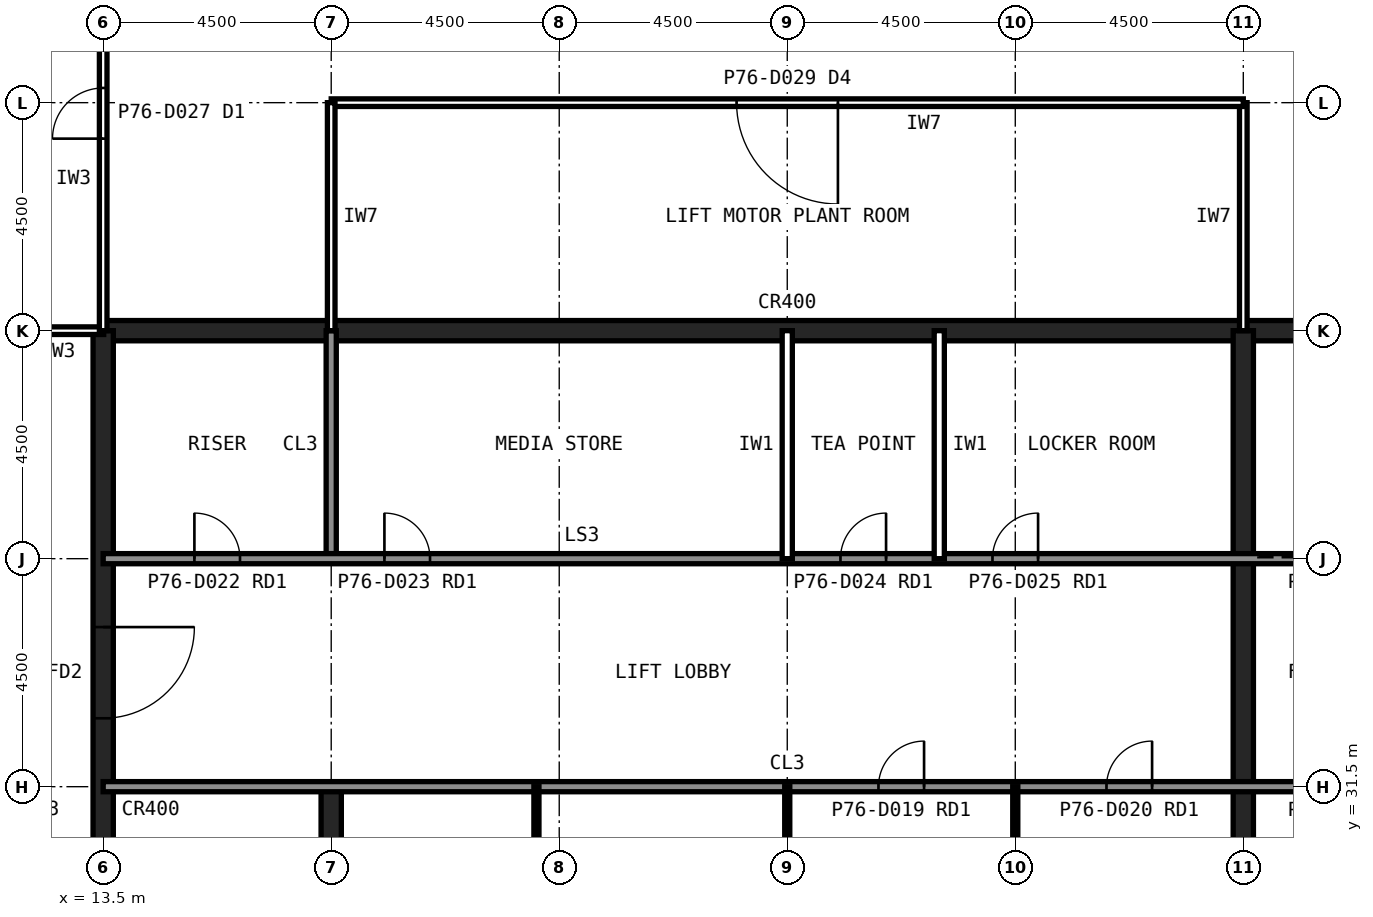
"""IFC4 building model, lengths in metres.
Left out: names, types, materials, properties, quantities, classifications, styles, units other than length and angle.
Written with IfcOpenShell. Run it as: python <this file> out.ifc"""

import sys

from ifc_helpers import new_model, si_unit, direction, frame, frame_2d, origin, place, context, subcontext, project, spatial, polyline, rectangle, outline, extrude, element, fill, save


model = new_model("IFC4")
c1 = context("Model", 3, precision=1e-05, world=origin(), true_north=direction((0.0, 1.0)))
c2 = subcontext(c1, "Body", "Model", "MODEL_VIEW")
j1 = project(units=[si_unit("LENGTHUNIT", "METRE"), si_unit("PLANEANGLEUNIT", "RADIAN")], contexts=[c1])
p1 = place(None, origin())
s1 = spatial("IfcSite", under=j1, at=p1, CompositionType="ELEMENT")
p2 = place(p1, origin())
s2 = spatial("IfcBuilding", under=s1, at=p2, CompositionType="ELEMENT")
p3 = place(p2, frame((0.0, 0.0, 320.1)))
s3 = spatial("IfcBuildingStorey", under=s2, at=p3, CompositionType="ELEMENT", Elevation=320.1)
p4 = place(p3, frame((40.5, 40.5, 0.0), z_axis=(0.0, 0.0, 1.0), x_axis=(-1.0, 0.0, 0.0)))
e1 = element("IfcWall", 1, at=p4, inside=s3, PredefinedType="SHEAR", context=c2, shape_type="SweptSolid", body=[
    extrude(rectangle(XDim=27.0, YDim=0.4, at=frame_2d((13.5, 0.0))), origin(), (0.0, 0.0, 1.0), 17.377),
])
p5 = place(p3, frame((13.5, 40.5, 0.0), z_axis=(0.0, 0.0, 1.0), x_axis=(0.0, -1.0, 0.0)))
e2 = element("IfcWall", 2, at=p5, inside=s3, PredefinedType="SHEAR", context=c2, shape_type="SweptSolid", body=[
    extrude(outline(polyline([(0.0, 0.0), (27.0, 0.0), (27.0, 9.277), (0.0, 17.377), (0.0, 0.0)])), frame((0.0, 0.2, 0.0), z_axis=(0.0, -1.0, 0.0), x_axis=(1.0, 0.0, 0.0)), (0.0, 0.0, 1.0), 0.4),
])
p6 = place(p5, frame((19.65, 0.0, 0.0)))
e3 = element("IfcOpeningElement", 3, at=p6, cuts=e2, PredefinedType="OPENING", context=c2, shape_type="SweptSolid", body=[
    extrude(rectangle(XDim=1.2, YDim=2.1, at=frame_2d((0.6, 1.05))), frame((0.0, 0.21, 0.0), z_axis=(0.0, -1.0, 0.0), x_axis=(1.0, 0.0, 0.0)), (0.0, 0.0, 1.0), 0.42),
])
p7 = place(p5, frame((5.85, 0.0, 0.0)))
e4 = element("IfcOpeningElement", 4, at=p7, cuts=e2, PredefinedType="OPENING", context=c2, shape_type="SweptSolid", body=[
    extrude(rectangle(XDim=1.8, YDim=2.1, at=frame_2d((0.9, 1.05))), frame((0.0, 0.21, 0.0), z_axis=(0.0, -1.0, 0.0), x_axis=(1.0, 0.0, 0.0)), (0.0, 0.0, 1.0), 0.42),
])
p8 = place(p3, frame((18.0, 13.5, 0.0), z_axis=(0.0, 0.0, 1.0), x_axis=(0.0, 1.0, 0.0)))
e5 = element("IfcWall", 5, at=p8, inside=s3, PredefinedType="SHEAR", context=c2, shape_type="SweptSolid", body=[
    extrude(outline(polyline([(0.0, 0.0), (18.0, 0.0), (18.0, 14.677), (0.0, 9.277), (0.0, 0.0)])), frame((0.0, 0.2, 0.0), z_axis=(0.0, -1.0, 0.0), x_axis=(1.0, 0.0, 0.0)), (0.0, 0.0, 1.0), 0.4),
])
p9 = place(p3, frame((18.0, 36.0, 0.0), z_axis=(0.0, 0.0, 1.0), x_axis=(0.0, 1.0, 0.0)))
e6 = element("IfcWall", 6, at=p9, inside=s3, PredefinedType="SOLIDWALL", context=c2, shape_type="SweptSolid", body=[
    extrude(outline(polyline([(0.0, 0.0), (4.5, 0.0), (4.5, 17.227), (0.0, 15.877), (0.0, 0.0)])), frame((0.0, 0.1, 0.0), z_axis=(0.0, -1.0, 0.0), x_axis=(1.0, 0.0, 0.0)), (0.0, 0.0, 1.0), 0.2),
])
p10 = place(p3, frame((36.0, 22.5, 0.0), z_axis=(0.0, 0.0, 1.0), x_axis=(0.0, 1.0, 0.0)))
e7 = element("IfcWall", 7, at=p10, inside=s3, PredefinedType="SHEAR", context=c2, shape_type="SweptSolid", body=[
    extrude(outline(polyline([(0.0, 0.0), (18.0, 0.0), (18.0, 17.377), (0.0, 11.977), (0.0, 0.0)])), frame((0.0, 0.2, 0.0), z_axis=(0.0, -1.0, 0.0), x_axis=(1.0, 0.0, 0.0)), (0.0, 0.0, 1.0), 0.4),
])
p11 = place(p3, frame((13.5, 36.0, 0.0), z_axis=(0.0, 0.0, 1.0), x_axis=(1.0, 0.0, 0.0)))
e8 = element("IfcWall", 8, at=p11, inside=s3, PredefinedType="SOLIDWALL", context=c2, shape_type="SweptSolid", body=[
    extrude(rectangle(XDim=27.0, YDim=0.2, at=frame_2d((13.5, 0.0))), origin(), (0.0, 0.0, 1.0), 15.877),
])
p12 = place(p11, frame((1.8, 0.0, 0.0)))
e9 = element("IfcOpeningElement", 9, at=p12, cuts=e8, PredefinedType="OPENING", context=c2, shape_type="SweptSolid", body=[
    extrude(rectangle(XDim=0.9, YDim=2.1, at=frame_2d((0.45, 1.05))), frame((0.0, 0.11, 0.0), z_axis=(0.0, -1.0, 0.0), x_axis=(1.0, 0.0, 0.0)), (0.0, 0.0, 1.0), 0.22),
])
p13 = place(p11, frame((5.55, 0.0, 0.0)))
e10 = element("IfcOpeningElement", 10, at=p13, cuts=e8, PredefinedType="OPENING", context=c2, shape_type="SweptSolid", body=[
    extrude(rectangle(XDim=0.9, YDim=2.1, at=frame_2d((0.45, 1.05))), frame((0.0, 0.11, 0.0), z_axis=(0.0, -1.0, 0.0), x_axis=(1.0, 0.0, 0.0)), (0.0, 0.0, 1.0), 0.22),
])
p14 = place(p11, frame((14.55, 0.0, 0.0)))
e11 = element("IfcOpeningElement", 11, at=p14, cuts=e8, PredefinedType="OPENING", context=c2, shape_type="SweptSolid", body=[
    extrude(rectangle(XDim=0.9, YDim=2.1, at=frame_2d((0.45, 1.05))), frame((0.0, 0.11, 0.0), z_axis=(0.0, -1.0, 0.0), x_axis=(1.0, 0.0, 0.0)), (0.0, 0.0, 1.0), 0.22),
])
p15 = place(p11, frame((17.55, 0.0, 0.0)))
e12 = element("IfcOpeningElement", 12, at=p15, cuts=e8, PredefinedType="OPENING", context=c2, shape_type="SweptSolid", body=[
    extrude(rectangle(XDim=0.9, YDim=2.1, at=frame_2d((0.45, 1.05))), frame((0.0, 0.11, 0.0), z_axis=(0.0, -1.0, 0.0), x_axis=(1.0, 0.0, 0.0)), (0.0, 0.0, 1.0), 0.22),
])
p16 = place(p11, frame((24.1, 0.0, 0.0)))
e13 = element("IfcOpeningElement", 13, at=p16, cuts=e8, PredefinedType="OPENING", context=c2, shape_type="SweptSolid", body=[
    extrude(rectangle(XDim=1.3, YDim=2.2, at=frame_2d((0.65, 1.1))), frame((0.0, 0.11, 0.0), z_axis=(0.0, -1.0, 0.0), x_axis=(1.0, 0.0, 0.0)), (0.0, 0.0, 1.0), 0.22),
])
p17 = place(p3, frame((13.5, 31.5, 0.0), z_axis=(0.0, 0.0, 1.0), x_axis=(1.0, 0.0, 0.0)))
e14 = element("IfcWall", 14, at=p17, inside=s3, PredefinedType="SOLIDWALL", context=c2, shape_type="SweptSolid", body=[
    extrude(rectangle(XDim=27.0, YDim=0.2, at=frame_2d((13.5, 0.0))), origin(), (0.0, 0.0, 1.0), 14.527),
])
p18 = place(p17, frame((24.15, 0.0, 0.0)))
e15 = element("IfcOpeningElement", 15, at=p18, cuts=e14, PredefinedType="OPENING", context=c2, shape_type="SweptSolid", body=[
    extrude(rectangle(XDim=1.2, YDim=2.1, at=frame_2d((0.6, 1.05))), frame((0.0, 0.11, 0.0), z_axis=(0.0, -1.0, 0.0), x_axis=(1.0, 0.0, 0.0)), (0.0, 0.0, 1.0), 0.22),
])
p19 = place(p17, frame((15.3, 0.0, 0.0)))
e16 = element("IfcOpeningElement", 16, at=p19, cuts=e14, PredefinedType="OPENING", context=c2, shape_type="SweptSolid", body=[
    extrude(rectangle(XDim=0.9, YDim=2.1, at=frame_2d((0.45, 1.05))), frame((0.0, 0.11, 0.0), z_axis=(0.0, -1.0, 0.0), x_axis=(1.0, 0.0, 0.0)), (0.0, 0.0, 1.0), 0.22),
])
p20 = place(p17, frame((19.8, 0.0, 0.0)))
e17 = element("IfcOpeningElement", 17, at=p20, cuts=e14, PredefinedType="OPENING", context=c2, shape_type="SweptSolid", body=[
    extrude(rectangle(XDim=0.9, YDim=2.1, at=frame_2d((0.45, 1.05))), frame((0.0, 0.11, 0.0), z_axis=(0.0, -1.0, 0.0), x_axis=(1.0, 0.0, 0.0)), (0.0, 0.0, 1.0), 0.22),
])
p21 = place(p3, frame((-0.63, 36.261, 0.0), z_axis=(0.0, 0.0, 1.0), x_axis=(0.707106781187, 0.707106781187, 0.0)))
e18 = element("IfcWall", 18, at=p21, inside=s3, PredefinedType="SOLIDWALL", context=c2, shape_type="SweptSolid", body=[
    extrude(outline(polyline([(0.0, 0.0), (25.978, 0.0), (25.978, 23.789), (0.0, 18.278), (0.0, 0.0)])), frame((0.0, 0.15, 0.0), z_axis=(0.0, -1.0, 0.0), x_axis=(1.0, 0.0, 0.0)), (0.0, 0.0, 1.0), 0.3),
])
p22 = place(p21, frame((0.424, 0.0, 1.2)))
e19 = element("IfcOpeningElement", 19, at=p22, cuts=e18, PredefinedType="OPENING", context=c2, shape_type="SweptSolid", body=[
    extrude(rectangle(XDim=2.4, YDim=2.4, at=frame_2d((1.2, 1.2))), frame((0.0, 0.16, 0.0), z_axis=(0.0, -1.0, 0.0), x_axis=(1.0, 0.0, 0.0)), (0.0, 0.0, 1.0), 0.32),
])
p23 = place(p21, frame((3.671, 0.0, 1.2)))
e20 = element("IfcOpeningElement", 20, at=p23, cuts=e18, PredefinedType="OPENING", context=c2, shape_type="SweptSolid", body=[
    extrude(rectangle(XDim=2.4, YDim=2.4, at=frame_2d((1.2, 1.2))), frame((0.0, 0.16, 0.0), z_axis=(0.0, -1.0, 0.0), x_axis=(1.0, 0.0, 0.0)), (0.0, 0.0, 1.0), 0.32),
])
p24 = place(p21, frame((6.918, 0.0, 1.2)))
e21 = element("IfcOpeningElement", 21, at=p24, cuts=e18, PredefinedType="OPENING", context=c2, shape_type="SweptSolid", body=[
    extrude(rectangle(XDim=2.4, YDim=2.4, at=frame_2d((1.2, 1.2))), frame((0.0, 0.16, 0.0), z_axis=(0.0, -1.0, 0.0), x_axis=(1.0, 0.0, 0.0)), (0.0, 0.0, 1.0), 0.32),
])
p25 = place(p21, frame((10.165, 0.0, 1.2)))
e22 = element("IfcOpeningElement", 22, at=p25, cuts=e18, PredefinedType="OPENING", context=c2, shape_type="SweptSolid", body=[
    extrude(rectangle(XDim=2.4, YDim=2.4, at=frame_2d((1.2, 1.2))), frame((0.0, 0.16, 0.0), z_axis=(0.0, -1.0, 0.0), x_axis=(1.0, 0.0, 0.0)), (0.0, 0.0, 1.0), 0.32),
])
p26 = place(p21, frame((13.412, 0.0, 11.15)))
e23 = element("IfcOpeningElement", 23, at=p26, cuts=e18, PredefinedType="OPENING", context=c2, shape_type="SweptSolid", body=[
    extrude(rectangle(XDim=2.4, YDim=2.4, at=frame_2d((1.2, 1.2))), frame((0.0, 0.16, 0.0), z_axis=(0.0, -1.0, 0.0), x_axis=(1.0, 0.0, 0.0)), (0.0, 0.0, 1.0), 0.32),
])
p27 = place(p21, frame((16.66, 0.0, 11.3)))
e24 = element("IfcOpeningElement", 24, at=p27, cuts=e18, PredefinedType="OPENING", context=c2, shape_type="SweptSolid", body=[
    extrude(rectangle(XDim=2.4, YDim=2.4, at=frame_2d((1.2, 1.2))), frame((0.0, 0.16, 0.0), z_axis=(0.0, -1.0, 0.0), x_axis=(1.0, 0.0, 0.0)), (0.0, 0.0, 1.0), 0.32),
])
p28 = place(p21, frame((19.907, 0.0, 1.2)))
e25 = element("IfcOpeningElement", 25, at=p28, cuts=e18, PredefinedType="OPENING", context=c2, shape_type="SweptSolid", body=[
    extrude(rectangle(XDim=2.4, YDim=2.4, at=frame_2d((1.2, 1.2))), frame((0.0, 0.16, 0.0), z_axis=(0.0, -1.0, 0.0), x_axis=(1.0, 0.0, 0.0)), (0.0, 0.0, 1.0), 0.32),
])
p29 = place(p21, frame((23.154, 0.0, 1.2)))
e26 = element("IfcOpeningElement", 26, at=p29, cuts=e18, PredefinedType="OPENING", context=c2, shape_type="SweptSolid", body=[
    extrude(rectangle(XDim=2.4, YDim=2.4, at=frame_2d((1.2, 1.2))), frame((0.0, 0.16, 0.0), z_axis=(0.0, -1.0, 0.0), x_axis=(1.0, 0.0, 0.0)), (0.0, 0.0, 1.0), 0.32),
])
p30 = place(p3, frame((36.261, 54.63, 0.0), z_axis=(0.0, 0.0, 1.0), x_axis=(0.707106781187, -0.707106781187, 0.0)))
e27 = element("IfcWall", 27, at=p30, inside=s3, PredefinedType="SOLIDWALL", context=c2, shape_type="SweptSolid", body=[
    extrude(outline(polyline([(0.0, 0.0), (25.978, 0.0), (25.978, 18.278), (0.0, 23.789), (0.0, 0.0)])), frame((0.0, 0.15, 0.0), z_axis=(0.0, -1.0, 0.0), x_axis=(1.0, 0.0, 0.0)), (0.0, 0.0, 1.0), 0.3),
])
p31 = place(p30, frame((0.424, 0.0, 1.2)))
e28 = element("IfcOpeningElement", 28, at=p31, cuts=e27, PredefinedType="OPENING", context=c2, shape_type="SweptSolid", body=[
    extrude(rectangle(XDim=2.4, YDim=2.4, at=frame_2d((1.2, 1.2))), frame((0.0, 0.16, 0.0), z_axis=(0.0, -1.0, 0.0), x_axis=(1.0, 0.0, 0.0)), (0.0, 0.0, 1.0), 0.32),
])
p32 = place(p30, frame((3.671, 0.0, 1.2)))
e29 = element("IfcOpeningElement", 29, at=p32, cuts=e27, PredefinedType="OPENING", context=c2, shape_type="SweptSolid", body=[
    extrude(rectangle(XDim=2.4, YDim=2.4, at=frame_2d((1.2, 1.2))), frame((0.0, 0.16, 0.0), z_axis=(0.0, -1.0, 0.0), x_axis=(1.0, 0.0, 0.0)), (0.0, 0.0, 1.0), 0.32),
])
p33 = place(p30, frame((6.918, 0.0, 11.3)))
e30 = element("IfcOpeningElement", 30, at=p33, cuts=e27, PredefinedType="OPENING", context=c2, shape_type="SweptSolid", body=[
    extrude(rectangle(XDim=2.4, YDim=2.4, at=frame_2d((1.2, 1.2))), frame((0.0, 0.16, 0.0), z_axis=(0.0, -1.0, 0.0), x_axis=(1.0, 0.0, 0.0)), (0.0, 0.0, 1.0), 0.32),
])
p34 = place(p30, frame((10.165, 0.0, 11.15)))
e31 = element("IfcOpeningElement", 31, at=p34, cuts=e27, PredefinedType="OPENING", context=c2, shape_type="SweptSolid", body=[
    extrude(rectangle(XDim=2.4, YDim=2.4, at=frame_2d((1.2, 1.2))), frame((0.0, 0.16, 0.0), z_axis=(0.0, -1.0, 0.0), x_axis=(1.0, 0.0, 0.0)), (0.0, 0.0, 1.0), 0.32),
])
p35 = place(p30, frame((13.412, 0.0, 1.2)))
e32 = element("IfcOpeningElement", 32, at=p35, cuts=e27, PredefinedType="OPENING", context=c2, shape_type="SweptSolid", body=[
    extrude(rectangle(XDim=2.4, YDim=2.4, at=frame_2d((1.2, 1.2))), frame((0.0, 0.16, 0.0), z_axis=(0.0, -1.0, 0.0), x_axis=(1.0, 0.0, 0.0)), (0.0, 0.0, 1.0), 0.32),
])
p36 = place(p30, frame((16.66, 0.0, 1.2)))
e33 = element("IfcOpeningElement", 33, at=p36, cuts=e27, PredefinedType="OPENING", context=c2, shape_type="SweptSolid", body=[
    extrude(rectangle(XDim=2.4, YDim=2.4, at=frame_2d((1.2, 1.2))), frame((0.0, 0.16, 0.0), z_axis=(0.0, -1.0, 0.0), x_axis=(1.0, 0.0, 0.0)), (0.0, 0.0, 1.0), 0.32),
])
p37 = place(p30, frame((19.907, 0.0, 1.2)))
e34 = element("IfcOpeningElement", 34, at=p37, cuts=e27, PredefinedType="OPENING", context=c2, shape_type="SweptSolid", body=[
    extrude(rectangle(XDim=2.4, YDim=2.4, at=frame_2d((1.2, 1.2))), frame((0.0, 0.16, 0.0), z_axis=(0.0, -1.0, 0.0), x_axis=(1.0, 0.0, 0.0)), (0.0, 0.0, 1.0), 0.32),
])
p38 = place(p30, frame((23.154, 0.0, 1.2)))
e35 = element("IfcOpeningElement", 35, at=p38, cuts=e27, PredefinedType="OPENING", context=c2, shape_type="SweptSolid", body=[
    extrude(rectangle(XDim=2.4, YDim=2.4, at=frame_2d((1.2, 1.2))), frame((0.0, 0.16, 0.0), z_axis=(0.0, -1.0, 0.0), x_axis=(1.0, 0.0, 0.0)), (0.0, 0.0, 1.0), 0.32),
])
for number, where, z_axis, x_axis in (
    (36, (27.0, 36.0, 0.0), (0.0, 0.0, 1.0), (0.0, 1.0, 0.0)),
    (37, (30.0, 36.0, 0.0), (0.0, 0.0, 1.0), (0.0, 1.0, 0.0)),
):
    element("IfcWall", number, at=place(p3, frame(where, z_axis=z_axis, x_axis=x_axis)), inside=s3, PredefinedType="PARTITIONING", context=c2, shape_type="SweptSolid", body=[
        extrude(rectangle(XDim=4.5, YDim=0.2, at=frame_2d((2.25, 0.0))), origin(), (0.0, 0.0, 1.0), 4.2),
    ])
for number, where, z_axis, x_axis in (
    (38, (22.05, 22.5, 0.0), (0.0, 0.0, 1.0), (0.0, 1.0, 0.0)),
    (39, (27.0, 22.5, 0.0), (0.0, 0.0, 1.0), (0.0, 1.0, 0.0)),
    (40, (31.5, 22.5, 0.0), (0.0, 0.0, 1.0), (0.0, 1.0, 0.0)),
):
    element("IfcWall", number, at=place(p3, frame(where, z_axis=z_axis, x_axis=x_axis)), inside=s3, PredefinedType="PLUMBINGWALL", context=c2, shape_type="SweptSolid", body=[
        extrude(rectangle(XDim=9.0, YDim=0.1, at=frame_2d((4.5, 0.0))), origin(), (0.0, 0.0, 1.0), 4.246),
    ])
p39 = place(p3, frame((13.51, 40.5, 0.0), z_axis=(0.0, 0.0, 1.0), x_axis=(-1.0, 0.0, 0.0)))
e41 = element("IfcWall", 41, at=p39, inside=s3, PredefinedType="PARTITIONING", context=c2, shape_type="SweptSolid", body=[
    extrude(rectangle(XDim=1.81, YDim=0.15, at=frame_2d((0.905, 0.0))), origin(), (0.0, 0.0, 1.0), 4.246),
])
p40 = place(p3, frame((36.0, 40.5, 0.0), z_axis=(0.0, 0.0, 1.0), x_axis=(0.0, 1.0, 0.0)))
e42 = element("IfcWall", 42, at=p40, inside=s3, PredefinedType="PARTITIONING", context=c2, shape_type="SweptSolid", body=[
    extrude(rectangle(XDim=4.5, YDim=0.15, at=frame_2d((2.25, 0.0))), origin(), (0.0, 0.0, 1.0), 4.246),
])
p41 = place(p3, frame((36.0, 45.0, 0.0), z_axis=(0.0, 0.0, 1.0), x_axis=(-1.0, 0.0, 0.0)))
e43 = element("IfcWall", 43, at=p41, inside=s3, PredefinedType="PARTITIONING", context=c2, shape_type="SweptSolid", body=[
    extrude(rectangle(XDim=18.0, YDim=0.15, at=frame_2d((9.0, 0.0))), origin(), (0.0, 0.0, 1.0), 4.246),
])
p42 = place(p41, frame((8.0, 0.0, 0.0)))
e44 = element("IfcOpeningElement", 44, at=p42, cuts=e43, PredefinedType="OPENING", context=c2, shape_type="SweptSolid", body=[
    extrude(rectangle(XDim=2.0, YDim=2.4, at=frame_2d((1.0, 1.2))), frame((0.0, 0.085, 0.0), z_axis=(0.0, -1.0, 0.0), x_axis=(1.0, 0.0, 0.0)), (0.0, 0.0, 1.0), 0.17),
])
p43 = place(p3, frame((18.0, 45.0, 0.0), z_axis=(0.0, 0.0, 1.0), x_axis=(0.0, -1.0, 0.0)))
e45 = element("IfcWall", 45, at=p43, inside=s3, PredefinedType="PARTITIONING", context=c2, shape_type="SweptSolid", body=[
    extrude(rectangle(XDim=4.5, YDim=0.15, at=frame_2d((2.25, 0.0))), origin(), (0.0, 0.0, 1.0), 4.246),
])
p44 = place(p3, frame((13.5, 40.5, 0.0), z_axis=(0.0, 0.0, 1.0), x_axis=(0.0, 1.0, 0.0)))
e46 = element("IfcWall", 46, at=p44, inside=s3, PredefinedType="PARTITIONING", context=c2, shape_type="SweptSolid", body=[
    extrude(rectangle(XDim=8.58, YDim=0.15, at=frame_2d((4.29, 0.0))), origin(), (0.0, 0.0, 1.0), 4.246),
])
p45 = place(p44, frame((3.79, 0.0, 0.0)))
e47 = element("IfcOpeningElement", 47, at=p45, cuts=e46, PredefinedType="OPENING", context=c2, shape_type="SweptSolid", body=[
    extrude(rectangle(XDim=1.0, YDim=2.1, at=frame_2d((0.5, 1.05))), frame((0.0, 0.085, 0.0), z_axis=(0.0, -1.0, 0.0), x_axis=(1.0, 0.0, 0.0)), (0.0, 0.0, 1.0), 0.17),
])
p46 = place(p7, origin())
e48 = element("IfcDoor", 48, at=p46, inside=s3, OperationType="SINGLE_SWING_LEFT", PredefinedType="DOOR", context=c2, shape_type="SweptSolid", body=[
    extrude(rectangle(XDim=1.8, YDim=2.1, at=frame_2d((0.9, 1.05))), frame((0.0, 0.025, 0.0), z_axis=(0.0, -1.0, 0.0), x_axis=(1.0, 0.0, 0.0)), (0.0, 0.0, 1.0), 0.05),
])
fill(e4, e48)
p47 = place(p19, origin())
e49 = element("IfcDoor", 49, at=p47, inside=s3, OperationType="SINGLE_SWING_RIGHT", PredefinedType="DOOR", context=c2, shape_type="SweptSolid", body=[
    extrude(rectangle(XDim=0.9, YDim=2.1, at=frame_2d((0.45, 1.05))), frame((0.0, 0.025, 0.0), z_axis=(0.0, -1.0, 0.0), x_axis=(1.0, 0.0, 0.0)), (0.0, 0.0, 1.0), 0.05),
])
fill(e16, e49)
p48 = place(p20, origin())
e50 = element("IfcDoor", 50, at=p48, inside=s3, OperationType="SINGLE_SWING_RIGHT", PredefinedType="DOOR", context=c2, shape_type="SweptSolid", body=[
    extrude(rectangle(XDim=0.9, YDim=2.1, at=frame_2d((0.45, 1.05))), frame((0.0, 0.025, 0.0), z_axis=(0.0, -1.0, 0.0), x_axis=(1.0, 0.0, 0.0)), (0.0, 0.0, 1.0), 0.05),
])
fill(e17, e50)
p49 = place(p12, origin())
e51 = element("IfcDoor", 51, at=p49, inside=s3, OperationType="SINGLE_SWING_LEFT", PredefinedType="DOOR", context=c2, shape_type="SweptSolid", body=[
    extrude(rectangle(XDim=0.9, YDim=2.1, at=frame_2d((0.45, 1.05))), frame((0.0, 0.025, 0.0), z_axis=(0.0, -1.0, 0.0), x_axis=(1.0, 0.0, 0.0)), (0.0, 0.0, 1.0), 0.05),
])
fill(e9, e51)
p50 = place(p13, origin())
e52 = element("IfcDoor", 52, at=p50, inside=s3, OperationType="SINGLE_SWING_LEFT", PredefinedType="DOOR", context=c2, shape_type="SweptSolid", body=[
    extrude(rectangle(XDim=0.9, YDim=2.1, at=frame_2d((0.45, 1.05))), frame((0.0, 0.025, 0.0), z_axis=(0.0, -1.0, 0.0), x_axis=(1.0, 0.0, 0.0)), (0.0, 0.0, 1.0), 0.05),
])
fill(e10, e52)
p51 = place(p14, origin())
e53 = element("IfcDoor", 53, at=p51, inside=s3, OperationType="SINGLE_SWING_RIGHT", PredefinedType="DOOR", context=c2, shape_type="SweptSolid", body=[
    extrude(rectangle(XDim=0.9, YDim=2.1, at=frame_2d((0.45, 1.05))), frame((0.0, 0.025, 0.0), z_axis=(0.0, -1.0, 0.0), x_axis=(1.0, 0.0, 0.0)), (0.0, 0.0, 1.0), 0.05),
])
fill(e11, e53)
p52 = place(p15, origin())
e54 = element("IfcDoor", 54, at=p52, inside=s3, OperationType="SINGLE_SWING_RIGHT", PredefinedType="DOOR", context=c2, shape_type="SweptSolid", body=[
    extrude(rectangle(XDim=0.9, YDim=2.1, at=frame_2d((0.45, 1.05))), frame((0.0, 0.025, 0.0), z_axis=(0.0, -1.0, 0.0), x_axis=(1.0, 0.0, 0.0)), (0.0, 0.0, 1.0), 0.05),
])
fill(e12, e54)
p53 = place(p42, origin())
e55 = element("IfcDoor", 55, at=p53, inside=s3, OperationType="SINGLE_SWING_LEFT", PredefinedType="DOOR", context=c2, shape_type="SweptSolid", body=[
    extrude(rectangle(XDim=2.0, YDim=2.4, at=frame_2d((1.0, 1.2))), frame((0.0, 0.025, 0.0), z_axis=(0.0, -1.0, 0.0), x_axis=(1.0, 0.0, 0.0)), (0.0, 0.0, 1.0), 0.05),
])
fill(e44, e55)
p54 = place(p45, origin())
e56 = element("IfcDoor", 56, at=p54, inside=s3, OperationType="SINGLE_SWING_LEFT", PredefinedType="DOOR", context=c2, shape_type="SweptSolid", body=[
    extrude(rectangle(XDim=1.0, YDim=2.1, at=frame_2d((0.5, 1.05))), frame((0.0, 0.025, 0.0), z_axis=(0.0, -1.0, 0.0), x_axis=(1.0, 0.0, 0.0)), (0.0, 0.0, 1.0), 0.05),
])
fill(e47, e56)
save(model, sys.argv[1])
